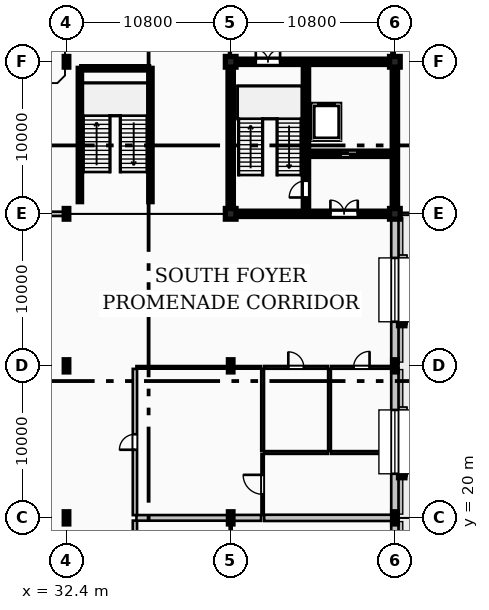
"""IFC4 building model, lengths in metres.
Left out: names, types, materials, properties, quantities, classifications, styles, units other than length and angle.
Written with IfcOpenShell. Run it as: python <this file> out.ifc"""

import sys

from ifc_helpers import new_model, si_unit, direction, frame, frame_2d, origin, origin_2d, place, context, subcontext, project, spatial, rectangle, i_section, extrude, element, fill, save


model = new_model("IFC4")
c1 = context("Model", 3, precision=1e-05, world=origin(), true_north=direction((0.0, 1.0)))
c2 = subcontext(c1, "Body", "Model", "MODEL_VIEW")
j1 = project(units=[si_unit("LENGTHUNIT", "METRE"), si_unit("PLANEANGLEUNIT", "RADIAN")], contexts=[c1])
p1 = place(None, origin())
s1 = spatial("IfcSite", under=j1, at=p1, CompositionType="ELEMENT")
p2 = place(p1, origin())
s2 = spatial("IfcBuilding", under=s1, at=p2, CompositionType="ELEMENT")
p3 = place(p2, origin())
s3 = spatial("IfcBuildingStorey", under=s2, at=p3, CompositionType="ELEMENT", Elevation=0.0)
for number, where, z_axis, x_axis in (
    (1, (32.4, 20.0, 0.0), (0.0, 0.0, 1.0), (1.0, 0.0, 0.0)),
    (2, (32.4, 30.0, 0.0), (0.0, 0.0, 1.0), (1.0, 0.0, 0.0)),
):
    element("IfcColumn", number, at=place(p3, frame(where, z_axis=z_axis, x_axis=x_axis)), inside=s3, PredefinedType="COLUMN", context=c2, shape_type="SweptSolid", body=[
        extrude(i_section(OverallWidth=0.3, OverallDepth=0.8, WebThickness=0.018, FlangeThickness=0.033, FilletRadius=0.03, at=origin_2d()), origin(), (0.0, 0.0, 1.0), 4.8),
    ])
for number, where, z_axis, x_axis in (
    (3, (32.4, 40.0, 0.0), (0.0, 0.0, 1.0), (1.0, 0.0, 0.0)),
    (4, (32.4, 50.0, 0.0), (0.0, 0.0, 1.0), (1.0, 0.0, 0.0)),
):
    element("IfcColumn", number, at=place(p3, frame(where, z_axis=z_axis, x_axis=x_axis)), inside=s3, PredefinedType="COLUMN", context=c2, shape_type="SweptSolid", body=[
        extrude(i_section(OverallWidth=0.3, OverallDepth=0.7, WebThickness=0.017, FlangeThickness=0.032, FilletRadius=0.027, at=origin_2d()), origin(), (0.0, 0.0, 1.0), 4.8),
    ])
for number, where, z_axis, x_axis in (
    (5, (43.2, 20.0, 0.0), (0.0, 0.0, 1.0), (1.0, 0.0, 0.0)),
    (6, (43.2, 30.0, 0.0), (0.0, 0.0, 1.0), (1.0, 0.0, 0.0)),
):
    element("IfcColumn", number, at=place(p3, frame(where, z_axis=z_axis, x_axis=x_axis)), inside=s3, PredefinedType="COLUMN", context=c2, shape_type="SweptSolid", body=[
        extrude(i_section(OverallWidth=0.3, OverallDepth=0.8, WebThickness=0.018, FlangeThickness=0.033, FilletRadius=0.03, at=origin_2d()), origin(), (0.0, 0.0, 1.0), 4.8),
    ])
for number, where, z_axis, x_axis in (
    (7, (43.2, 40.0, 0.0), (0.0, 0.0, 1.0), (1.0, 0.0, 0.0)),
    (8, (43.2, 50.0, 0.0), (0.0, 0.0, 1.0), (1.0, 0.0, 0.0)),
):
    element("IfcColumn", number, at=place(p3, frame(where, z_axis=z_axis, x_axis=x_axis)), inside=s3, PredefinedType="COLUMN", context=c2, shape_type="SweptSolid", body=[
        extrude(rectangle(XDim=0.7, YDim=0.7, at=origin_2d()), origin(), (0.0, 0.0, 1.0), 4.8),
    ])
for number, where, z_axis, x_axis in (
    (9, (54.0, 20.0, 0.0), (0.0, 0.0, 1.0), (1.0, 0.0, 0.0)),
    (10, (54.0, 30.0, 0.0), (0.0, 0.0, 1.0), (1.0, 0.0, 0.0)),
):
    element("IfcColumn", number, at=place(p3, frame(where, z_axis=z_axis, x_axis=x_axis)), inside=s3, PredefinedType="COLUMN", context=c2, shape_type="SweptSolid", body=[
        extrude(i_section(OverallWidth=0.3, OverallDepth=0.8, WebThickness=0.018, FlangeThickness=0.033, FilletRadius=0.03, at=origin_2d()), origin(), (0.0, 0.0, 1.0), 4.8),
    ])
for number, where, z_axis, x_axis in (
    (11, (54.0, 40.0, 0.0), (0.0, 0.0, 1.0), (1.0, 0.0, 0.0)),
    (12, (54.0, 50.0, 0.0), (0.0, 0.0, 1.0), (1.0, 0.0, 0.0)),
):
    element("IfcColumn", number, at=place(p3, frame(where, z_axis=z_axis, x_axis=x_axis)), inside=s3, PredefinedType="COLUMN", context=c2, shape_type="SweptSolid", body=[
        extrude(rectangle(XDim=0.7, YDim=0.7, at=origin_2d()), origin(), (0.0, 0.0, 1.0), 4.8),
    ])
p4 = place(p3, frame((54.0, 10.145, 0.0), z_axis=(0.0, 0.0, 1.0), x_axis=(0.0, 1.0, 0.0)))
e13 = element("IfcWall", 13, at=p4, inside=s3, PredefinedType="STANDARD", context=c2, shape_type="SweptSolid", body=[
    extrude(rectangle(XDim=9.71, YDim=0.48, at=frame_2d((4.855, 0.0))), origin(), (0.0, 0.0, 1.0), 4.56),
])
p5 = place(p4, frame((2.755, 0.0, 0.9)))
e14 = element("IfcOpeningElement", 14, at=p5, cuts=e13, PredefinedType="OPENING", context=c2, shape_type="SweptSolid", body=[
    extrude(rectangle(XDim=4.2, YDim=2.7, at=frame_2d((2.1, 1.35))), frame((0.0, 0.25, 0.0), z_axis=(0.0, -1.0, 0.0), x_axis=(1.0, 0.0, 0.0)), (0.0, 0.0, 1.0), 0.5),
])
p6 = place(p3, frame((54.0, 20.145, 0.0), z_axis=(0.0, 0.0, 1.0), x_axis=(0.0, 1.0, 0.0)))
e15 = element("IfcWall", 15, at=p6, inside=s3, PredefinedType="STANDARD", context=c2, shape_type="SweptSolid", body=[
    extrude(rectangle(XDim=9.71, YDim=0.48, at=frame_2d((4.855, 0.0))), origin(), (0.0, 0.0, 1.0), 4.56),
])
p7 = place(p6, frame((2.755, 0.0, 0.9)))
e16 = element("IfcOpeningElement", 16, at=p7, cuts=e15, PredefinedType="OPENING", context=c2, shape_type="SweptSolid", body=[
    extrude(rectangle(XDim=4.2, YDim=2.7, at=frame_2d((2.1, 1.35))), frame((0.0, 0.25, 0.0), z_axis=(0.0, -1.0, 0.0), x_axis=(1.0, 0.0, 0.0)), (0.0, 0.0, 1.0), 0.5),
])
p8 = place(p3, frame((54.0, 30.145, 0.0), z_axis=(0.0, 0.0, 1.0), x_axis=(0.0, 1.0, 0.0)))
e17 = element("IfcWall", 17, at=p8, inside=s3, PredefinedType="STANDARD", context=c2, shape_type="SweptSolid", body=[
    extrude(rectangle(XDim=9.71, YDim=0.48, at=frame_2d((4.855, 0.0))), origin(), (0.0, 0.0, 1.0), 4.56),
])
p9 = place(p8, frame((2.755, 0.0, 0.9)))
e18 = element("IfcOpeningElement", 18, at=p9, cuts=e17, PredefinedType="OPENING", context=c2, shape_type="SweptSolid", body=[
    extrude(rectangle(XDim=4.2, YDim=2.7, at=frame_2d((2.1, 1.35))), frame((0.0, 0.25, 0.0), z_axis=(0.0, -1.0, 0.0), x_axis=(1.0, 0.0, 0.0)), (0.0, 0.0, 1.0), 0.5),
])
p10 = place(p3, frame((54.145, 40.0, 0.0), z_axis=(0.0, 0.0, 1.0), x_axis=(1.0, 0.0, 0.0)))
e19 = element("IfcWall", 19, at=p10, inside=s3, PredefinedType="STANDARD", context=c2, shape_type="SweptSolid", body=[
    extrude(rectangle(XDim=0.225, YDim=0.3, at=frame_2d((0.113, 0.0))), origin(), (0.0, 0.0, 1.0), 4.56),
])
p11 = place(p3, frame((43.55, 40.0, 0.0), z_axis=(0.0, 0.0, 1.0), x_axis=(1.0, 0.0, 0.0)))
e20 = element("IfcWall", 20, at=p11, inside=s3, PredefinedType="SHEAR", context=c2, shape_type="SweptSolid", body=[
    extrude(rectangle(XDim=10.1, YDim=0.35, at=frame_2d((5.05, 0.0))), origin(), (0.0, 0.0, 1.0), 4.56),
])
p12 = place(p11, frame((6.21, 0.0, 0.0)))
e21 = element("IfcOpeningElement", 21, at=p12, cuts=e20, PredefinedType="OPENING", context=c2, shape_type="SweptSolid", body=[
    extrude(rectangle(XDim=1.8, YDim=2.25, at=frame_2d((0.9, 1.125))), frame((0.0, 0.185, 0.0), z_axis=(0.0, -1.0, 0.0), x_axis=(1.0, 0.0, 0.0)), (0.0, 0.0, 1.0), 0.37),
])
p13 = place(p3, frame((43.55, 50.0, 0.0), z_axis=(0.0, 0.0, 1.0), x_axis=(1.0, 0.0, 0.0)))
e22 = element("IfcWall", 22, at=p13, inside=s3, PredefinedType="SHEAR", context=c2, shape_type="SweptSolid", body=[
    extrude(rectangle(XDim=10.1, YDim=0.35, at=frame_2d((5.05, 0.0))), origin(), (0.0, 0.0, 1.0), 4.56),
])
p14 = place(p13, frame((1.3, 0.0, 0.0)))
e23 = element("IfcOpeningElement", 23, at=p14, cuts=e22, PredefinedType="OPENING", context=c2, shape_type="SweptSolid", body=[
    extrude(rectangle(XDim=1.6, YDim=2.2, at=frame_2d((0.8, 1.1))), frame((0.0, 0.185, 0.0), z_axis=(0.0, -1.0, 0.0), x_axis=(1.0, 0.0, 0.0)), (0.0, 0.0, 1.0), 0.37),
])
for number, where, z_axis, x_axis in (
    (24, (43.2, 40.35, 0.0), (0.0, 0.0, 1.0), (0.0, 1.0, 0.0)),
    (25, (54.0, 40.35, 0.0), (0.0, 0.0, 1.0), (0.0, 1.0, 0.0)),
):
    element("IfcWall", number, at=place(p3, frame(where, z_axis=z_axis, x_axis=x_axis)), inside=s3, PredefinedType="SHEAR", context=c2, shape_type="SweptSolid", body=[
        extrude(rectangle(XDim=9.3, YDim=0.35, at=frame_2d((4.65, 0.0))), origin(), (0.0, 0.0, 1.0), 4.56),
    ])
p15 = place(p3, frame((48.15, 40.175, 0.0), z_axis=(0.0, 0.0, 1.0), x_axis=(0.0, 1.0, 0.0)))
e26 = element("IfcWall", 26, at=p15, inside=s3, PredefinedType="SHEAR", context=c2, shape_type="SweptSolid", body=[
    extrude(rectangle(XDim=9.65, YDim=0.35, at=frame_2d((4.825, 0.0))), origin(), (0.0, 0.0, 1.0), 4.56),
])
p16 = place(p15, frame((0.9, 0.0, 0.0)))
e27 = element("IfcOpeningElement", 27, at=p16, cuts=e26, PredefinedType="OPENING", context=c2, shape_type="SweptSolid", body=[
    extrude(rectangle(XDim=1.1, YDim=2.2, at=frame_2d((0.55, 1.1))), frame((0.0, 0.185, 0.0), z_axis=(0.0, -1.0, 0.0), x_axis=(1.0, 0.0, 0.0)), (0.0, 0.0, 1.0), 0.37),
])
p17 = place(p3, frame((48.33, 43.95, 0.0), z_axis=(0.0, 0.0, 1.0), x_axis=(1.0, 0.0, 0.0)))
e28 = element("IfcWall", 28, at=p17, inside=s3, PredefinedType="SHEAR", context=c2, shape_type="SweptSolid", body=[
    extrude(rectangle(XDim=5.49, YDim=0.35, at=frame_2d((2.745, 0.0))), origin(), (0.0, 0.0, 1.0), 4.56),
])
p18 = place(p17, frame((2.1, 0.0, 0.0)))
e29 = element("IfcOpeningElement", 29, at=p18, cuts=e28, PredefinedType="OPENING", context=c2, shape_type="SweptSolid", body=[
    extrude(rectangle(XDim=1.1, YDim=2.2, at=frame_2d((0.55, 1.1))), frame((0.0, 0.185, 0.0), z_axis=(0.0, -1.0, 0.0), x_axis=(1.0, 0.0, 0.0)), (0.0, 0.0, 1.0), 0.37),
])
for number, where, z_axis, x_axis in (
    (30, (33.28, 40.8, 0.0), (0.0, 0.0, 1.0), (0.0, 1.0, 0.0)),
    (31, (37.92, 40.8, 0.0), (0.0, 0.0, 1.0), (0.0, 1.0, 0.0)),
):
    element("IfcWall", number, at=place(p3, frame(where, z_axis=z_axis, x_axis=x_axis)), inside=s3, PredefinedType="SHEAR", context=c2, shape_type="SweptSolid", body=[
        extrude(rectangle(XDim=8.77, YDim=0.22, at=frame_2d((4.385, 0.0))), origin(), (0.0, 0.0, 1.0), 4.56),
    ])
p19 = place(p3, frame((33.4, 49.57, 0.0), z_axis=(0.0, 0.0, 1.0), x_axis=(1.0, 0.0, 0.0)))
e32 = element("IfcWall", 32, at=p19, inside=s3, PredefinedType="SHEAR", context=c2, shape_type="SweptSolid", body=[
    extrude(rectangle(XDim=4.4, YDim=0.22, at=frame_2d((2.2, 0.0))), origin(), (0.0, 0.0, 1.0), 4.56),
])
p20 = place(p3, frame((45.4, 29.9, 0.0), z_axis=(0.0, 0.0, 1.0), x_axis=(1.0, 0.0, 0.0)))
e33 = element("IfcWall", 33, at=p20, inside=s3, PredefinedType="PLUMBINGWALL", context=c2, shape_type="SweptSolid", body=[
    extrude(rectangle(XDim=4.2, YDim=0.18, at=frame_2d((2.1, 0.0))), origin(), (0.0, 0.0, 1.0), 4.069),
])
p21 = place(p20, frame((1.59, 0.0, 0.0)))
e34 = element("IfcOpeningElement", 34, at=p21, cuts=e33, PredefinedType="OPENING", context=c2, shape_type="SweptSolid", body=[
    extrude(rectangle(XDim=1.02, YDim=2.15, at=frame_2d((0.51, 1.075))), frame((0.0, 0.1, 0.0), z_axis=(0.0, -1.0, 0.0), x_axis=(1.0, 0.0, 0.0)), (0.0, 0.0, 1.0), 0.2),
])
p22 = place(p3, frame((49.8, 29.9, 0.0), z_axis=(0.0, 0.0, 1.0), x_axis=(1.0, 0.0, 0.0)))
e35 = element("IfcWall", 35, at=p22, inside=s3, PredefinedType="PLUMBINGWALL", context=c2, shape_type="SweptSolid", body=[
    extrude(rectangle(XDim=4.02, YDim=0.18, at=frame_2d((2.01, 0.0))), origin(), (0.0, 0.0, 1.0), 4.069),
])
p23 = place(p22, frame((1.485, 0.0, 0.0)))
e36 = element("IfcOpeningElement", 36, at=p23, cuts=e35, PredefinedType="OPENING", context=c2, shape_type="SweptSolid", body=[
    extrude(rectangle(XDim=1.05, YDim=2.15, at=frame_2d((0.525, 1.075))), frame((0.0, 0.1, 0.0), z_axis=(0.0, -1.0, 0.0), x_axis=(1.0, 0.0, 0.0)), (0.0, 0.0, 1.0), 0.2),
])
p24 = place(p3, frame((21.8, 40.0, 0.0), z_axis=(0.0, 0.0, 1.0), x_axis=(1.0, 0.0, 0.0)))
e37 = element("IfcWall", 37, at=p24, inside=s3, PredefinedType="SOLIDWALL", context=c2, shape_type="SweptSolid", body=[
    extrude(rectangle(XDim=10.4, YDim=0.28, at=frame_2d((5.2, 0.0))), origin(), (0.0, 0.0, 1.0), 3.989),
])
p25 = place(p3, frame((36.9, 10.18, 0.0), z_axis=(0.0, 0.0, 1.0), x_axis=(0.0, 1.0, 0.0)))
e38 = element("IfcWall", 38, at=p25, inside=s3, PredefinedType="SOLIDWALL", context=c2, shape_type="SweptSolid", body=[
    extrude(rectangle(XDim=9.64, YDim=0.28, at=frame_2d((4.82, 0.0))), origin(), (0.0, 0.0, 1.0), 4.52),
])
p26 = place(p25, frame((3.47, 0.0, 0.0)))
e39 = element("IfcOpeningElement", 39, at=p26, cuts=e38, PredefinedType="OPENING", context=c2, shape_type="SweptSolid", body=[
    extrude(rectangle(XDim=2.7, YDim=2.85, at=frame_2d((1.35, 1.425))), frame((0.0, 0.15, 0.0), z_axis=(0.0, -1.0, 0.0), x_axis=(1.0, 0.0, 0.0)), (0.0, 0.0, 1.0), 0.3),
])
p27 = place(p3, frame((36.9, 20.18, 0.0), z_axis=(0.0, 0.0, 1.0), x_axis=(0.0, 1.0, 0.0)))
e40 = element("IfcWall", 40, at=p27, inside=s3, PredefinedType="SOLIDWALL", context=c2, shape_type="SweptSolid", body=[
    extrude(rectangle(XDim=9.62, YDim=0.28, at=frame_2d((4.81, 0.0))), origin(), (0.0, 0.0, 1.0), 4.52),
])
p28 = place(p27, frame((4.3, 0.0, 0.0)))
e41 = element("IfcOpeningElement", 41, at=p28, cuts=e40, PredefinedType="OPENING", context=c2, shape_type="SweptSolid", body=[
    extrude(rectangle(XDim=1.02, YDim=2.18, at=frame_2d((0.51, 1.09))), frame((0.0, 0.15, 0.0), z_axis=(0.0, -1.0, 0.0), x_axis=(1.0, 0.0, 0.0)), (0.0, 0.0, 1.0), 0.3),
])
p29 = place(p3, frame((43.15, 50.18, 0.0), z_axis=(0.0, 0.0, 1.0), x_axis=(0.0, 1.0, 0.0)))
e42 = element("IfcWall", 42, at=p29, inside=s3, PredefinedType="PARTITIONING", context=c2, shape_type="SweptSolid", body=[
    extrude(rectangle(XDim=11.64, YDim=0.11, at=frame_2d((5.82, 0.0))), origin(), (0.0, 0.0, 1.0), 3.939),
])
p30 = place(p29, frame((5.29, 0.0, 0.0)))
e43 = element("IfcOpeningElement", 43, at=p30, cuts=e42, PredefinedType="OPENING", context=c2, shape_type="SweptSolid", body=[
    extrude(rectangle(XDim=1.06, YDim=2.22, at=frame_2d((0.53, 1.11))), frame((0.0, 0.065, 0.0), z_axis=(0.0, -1.0, 0.0), x_axis=(1.0, 0.0, 0.0)), (0.0, 0.0, 1.0), 0.13),
])
p31 = place(p3, frame((43.2, 10.18, 0.0), z_axis=(0.0, 0.0, 1.0), x_axis=(0.0, 1.0, 0.0)))
e44 = element("IfcWall", 44, at=p31, inside=s3, PredefinedType="PARTITIONING", context=c2, shape_type="SweptSolid", body=[
    extrude(rectangle(XDim=9.64, YDim=0.13, at=frame_2d((4.82, 0.0))), origin(), (0.0, 0.0, 1.0), 4.06),
])
p32 = place(p31, frame((4.23, 0.0, 0.0)))
e45 = element("IfcOpeningElement", 45, at=p32, cuts=e44, PredefinedType="OPENING", context=c2, shape_type="SweptSolid", body=[
    extrude(rectangle(XDim=1.18, YDim=2.28, at=frame_2d((0.59, 1.14))), frame((0.0, 0.075, 0.0), z_axis=(0.0, -1.0, 0.0), x_axis=(1.0, 0.0, 0.0)), (0.0, 0.0, 1.0), 0.15),
])
p33 = place(p3, frame((45.3, 20.18, 0.0), z_axis=(0.0, 0.0, 1.0), x_axis=(0.0, 1.0, 0.0)))
e46 = element("IfcWall", 46, at=p33, inside=s3, PredefinedType="PARTITIONING", context=c2, shape_type="SweptSolid", body=[
    extrude(rectangle(XDim=4.02, YDim=0.15, at=frame_2d((2.01, 0.0))), origin(), (0.0, 0.0, 1.0), 4.52),
])
p34 = place(p33, frame((1.37, 0.0, 0.0)))
e47 = element("IfcOpeningElement", 47, at=p34, cuts=e46, PredefinedType="OPENING", context=c2, shape_type="SweptSolid", body=[
    extrude(rectangle(XDim=1.28, YDim=2.32, at=frame_2d((0.64, 1.16))), frame((0.0, 0.085, 0.0), z_axis=(0.0, -1.0, 0.0), x_axis=(1.0, 0.0, 0.0)), (0.0, 0.0, 1.0), 0.17),
])
p35 = place(p3, frame((37.0, 20.0, 0.0), z_axis=(0.0, 0.0, 1.0), x_axis=(1.0, 0.0, 0.0)))
e48 = element("IfcWall", 48, at=p35, inside=s3, PredefinedType="PARTITIONING", context=c2, shape_type="SweptSolid", body=[
    extrude(rectangle(XDim=6.02, YDim=0.37, at=frame_2d((3.01, 0.0))), origin(), (0.0, 0.0, 1.0), 4.069),
])
p36 = place(p3, frame((43.38, 20.0, 0.0), z_axis=(0.0, 0.0, 1.0), x_axis=(1.0, 0.0, 0.0)))
e49 = element("IfcWall", 49, at=p36, inside=s3, PredefinedType="PARTITIONING", context=c2, shape_type="SweptSolid", body=[
    extrude(rectangle(XDim=1.82, YDim=0.39, at=frame_2d((0.91, 0.0))), origin(), (0.0, 0.0, 1.0), 4.069),
])
p37 = place(p3, frame((45.4, 20.0, 0.0), z_axis=(0.0, 0.0, 1.0), x_axis=(1.0, 0.0, 0.0)))
e50 = element("IfcWall", 50, at=p37, inside=s3, PredefinedType="PARTITIONING", context=c2, shape_type="SweptSolid", body=[
    extrude(rectangle(XDim=8.42, YDim=0.41, at=frame_2d((4.21, 0.0))), origin(), (0.0, 0.0, 1.0), 4.069),
])
p38 = place(p3, frame((45.4, 24.3, 0.0), z_axis=(0.0, 0.0, 1.0), x_axis=(1.0, 0.0, 0.0)))
e51 = element("IfcWall", 51, at=p38, inside=s3, PredefinedType="PLUMBINGWALL", context=c2, shape_type="SweptSolid", body=[
    extrude(rectangle(XDim=4.2, YDim=0.18, at=frame_2d((2.1, 0.0))), origin(), (0.0, 0.0, 1.0), 4.52),
])
p39 = place(p3, frame((49.8, 24.3, 0.0), z_axis=(0.0, 0.0, 1.0), x_axis=(1.0, 0.0, 0.0)))
e52 = element("IfcWall", 52, at=p39, inside=s3, PredefinedType="PLUMBINGWALL", context=c2, shape_type="SweptSolid", body=[
    extrude(rectangle(XDim=4.02, YDim=0.18, at=frame_2d((2.01, 0.0))), origin(), (0.0, 0.0, 1.0), 4.52),
])
p40 = place(p3, frame((37.0, 29.9, 0.0), z_axis=(0.0, 0.0, 1.0), x_axis=(1.0, 0.0, 0.0)))
e53 = element("IfcWall", 53, at=p40, inside=s3, PredefinedType="PARTITIONING", context=c2, shape_type="SweptSolid", body=[
    extrude(rectangle(XDim=6.0, YDim=0.17, at=frame_2d((3.0, 0.0))), origin(), (0.0, 0.0, 1.0), 4.069),
])
p41 = place(p3, frame((43.4, 29.9, 0.0), z_axis=(0.0, 0.0, 1.0), x_axis=(1.0, 0.0, 0.0)))
e54 = element("IfcWall", 54, at=p41, inside=s3, PredefinedType="PARTITIONING", context=c2, shape_type="SweptSolid", body=[
    extrude(rectangle(XDim=1.8, YDim=0.17, at=frame_2d((0.9, 0.0))), origin(), (0.0, 0.0, 1.0), 4.069),
])
for number, where, z_axis, x_axis in (
    (55, (45.3, 24.4, 0.0), (0.0, 0.0, 1.0), (0.0, 1.0, 0.0)),
    (56, (49.7, 24.4, 0.0), (0.0, 0.0, 1.0), (0.0, 1.0, 0.0)),
):
    element("IfcWall", number, at=place(p3, frame(where, z_axis=z_axis, x_axis=x_axis)), inside=s3, PredefinedType="PLUMBINGWALL", context=c2, shape_type="SweptSolid", body=[
        extrude(rectangle(XDim=5.4, YDim=0.18, at=frame_2d((2.7, 0.0))), origin(), (0.0, 0.0, 1.0), 4.52),
    ])
p42 = place(p3, frame((53.86, 50.18, 0.0), z_axis=(0.0, 0.0, 1.0), x_axis=(0.0, 1.0, 0.0)))
e57 = element("IfcWall", 57, at=p42, inside=s3, PredefinedType="PARTITIONING", context=c2, shape_type="SweptSolid", body=[
    extrude(rectangle(XDim=11.62, YDim=0.17, at=frame_2d((5.81, 0.0))), origin(), (0.0, 0.0, 1.0), 4.52),
])
p43 = place(p7, origin())
e58 = element("IfcWindow", 58, at=p43, inside=s3, PartitioningType="SINGLE_PANEL", PredefinedType="WINDOW", context=c2, shape_type="SweptSolid", body=[
    extrude(rectangle(XDim=4.2, YDim=2.7, at=frame_2d((2.1, 1.35))), frame((0.0, 0.03, 0.0), z_axis=(0.0, -1.0, 0.0), x_axis=(1.0, 0.0, 0.0)), (0.0, 0.0, 1.0), 0.06),
])
fill(e16, e58)
p44 = place(p9, origin())
e59 = element("IfcWindow", 59, at=p44, inside=s3, PartitioningType="SINGLE_PANEL", PredefinedType="WINDOW", context=c2, shape_type="SweptSolid", body=[
    extrude(rectangle(XDim=4.2, YDim=2.7, at=frame_2d((2.1, 1.35))), frame((0.0, 0.03, 0.0), z_axis=(0.0, -1.0, 0.0), x_axis=(1.0, 0.0, 0.0)), (0.0, 0.0, 1.0), 0.06),
])
fill(e18, e59)
p45 = place(p16, origin())
e60 = element("IfcDoor", 60, at=p45, inside=s3, OperationType="SINGLE_SWING_LEFT", PredefinedType="DOOR", context=c2, shape_type="SweptSolid", body=[
    extrude(rectangle(XDim=1.1, YDim=2.2, at=frame_2d((0.55, 1.1))), frame((0.0, 0.025, 0.0), z_axis=(0.0, -1.0, 0.0), x_axis=(1.0, 0.0, 0.0)), (0.0, 0.0, 1.0), 0.05),
])
fill(e27, e60)
p46 = place(p12, origin())
e61 = element("IfcDoor", 61, at=p46, inside=s3, OperationType="DOUBLE_DOOR_SINGLE_SWING", PredefinedType="DOOR", context=c2, shape_type="SweptSolid", body=[
    extrude(rectangle(XDim=1.8, YDim=2.25, at=frame_2d((0.9, 1.125))), frame((0.0, 0.025, 0.0), z_axis=(0.0, -1.0, 0.0), x_axis=(1.0, 0.0, 0.0)), (0.0, 0.0, 1.0), 0.05),
])
fill(e21, e61)
p47 = place(p14, origin())
e62 = element("IfcDoor", 62, at=p47, inside=s3, OperationType="DOUBLE_DOOR_SINGLE_SWING", PredefinedType="DOOR", context=c2, shape_type="SweptSolid", body=[
    extrude(rectangle(XDim=1.6, YDim=2.2, at=frame_2d((0.8, 1.1))), frame((0.0, 0.025, 0.0), z_axis=(0.0, -1.0, 0.0), x_axis=(1.0, 0.0, 0.0)), (0.0, 0.0, 1.0), 0.05),
])
fill(e23, e62)
p48 = place(p18, origin())
e63 = element("IfcDoor", 63, at=p48, inside=s3, OperationType="DOUBLE_DOOR_SLIDING", PredefinedType="DOOR", context=c2, shape_type="SweptSolid", body=[
    extrude(rectangle(XDim=1.1, YDim=2.2, at=frame_2d((0.55, 1.1))), frame((0.0, 0.025, 0.0), z_axis=(0.0, -1.0, 0.0), x_axis=(1.0, 0.0, 0.0)), (0.0, 0.0, 1.0), 0.05),
])
fill(e29, e63)
p49 = place(p21, origin())
e64 = element("IfcDoor", 64, at=p49, inside=s3, OperationType="SINGLE_SWING_LEFT", PredefinedType="DOOR", context=c2, shape_type="SweptSolid", body=[
    extrude(rectangle(XDim=1.02, YDim=2.15, at=frame_2d((0.51, 1.075))), frame((0.0, 0.025, 0.0), z_axis=(0.0, -1.0, 0.0), x_axis=(1.0, 0.0, 0.0)), (0.0, 0.0, 1.0), 0.05),
])
fill(e34, e64)
p50 = place(p23, origin())
e65 = element("IfcDoor", 65, at=p50, inside=s3, OperationType="SINGLE_SWING_RIGHT", PredefinedType="DOOR", context=c2, shape_type="SweptSolid", body=[
    extrude(rectangle(XDim=1.05, YDim=2.15, at=frame_2d((0.525, 1.075))), frame((0.0, 0.025, 0.0), z_axis=(0.0, -1.0, 0.0), x_axis=(1.0, 0.0, 0.0)), (0.0, 0.0, 1.0), 0.05),
])
fill(e36, e65)
p51 = place(p28, origin())
e66 = element("IfcDoor", 66, at=p51, inside=s3, OperationType="SINGLE_SWING_LEFT", PredefinedType="DOOR", context=c2, shape_type="SweptSolid", body=[
    extrude(rectangle(XDim=1.02, YDim=2.18, at=frame_2d((0.51, 1.09))), frame((0.0, 0.025, 0.0), z_axis=(0.0, -1.0, 0.0), x_axis=(1.0, 0.0, 0.0)), (0.0, 0.0, 1.0), 0.05),
])
fill(e41, e66)
p52 = place(p34, origin())
e67 = element("IfcDoor", 67, at=p52, inside=s3, OperationType="SINGLE_SWING_RIGHT", PredefinedType="DOOR", context=c2, shape_type="SweptSolid", body=[
    extrude(rectangle(XDim=1.28, YDim=2.32, at=frame_2d((0.64, 1.16))), frame((0.0, 0.025, 0.0), z_axis=(0.0, -1.0, 0.0), x_axis=(1.0, 0.0, 0.0)), (0.0, 0.0, 1.0), 0.05),
])
fill(e47, e67)
save(model, sys.argv[1])
